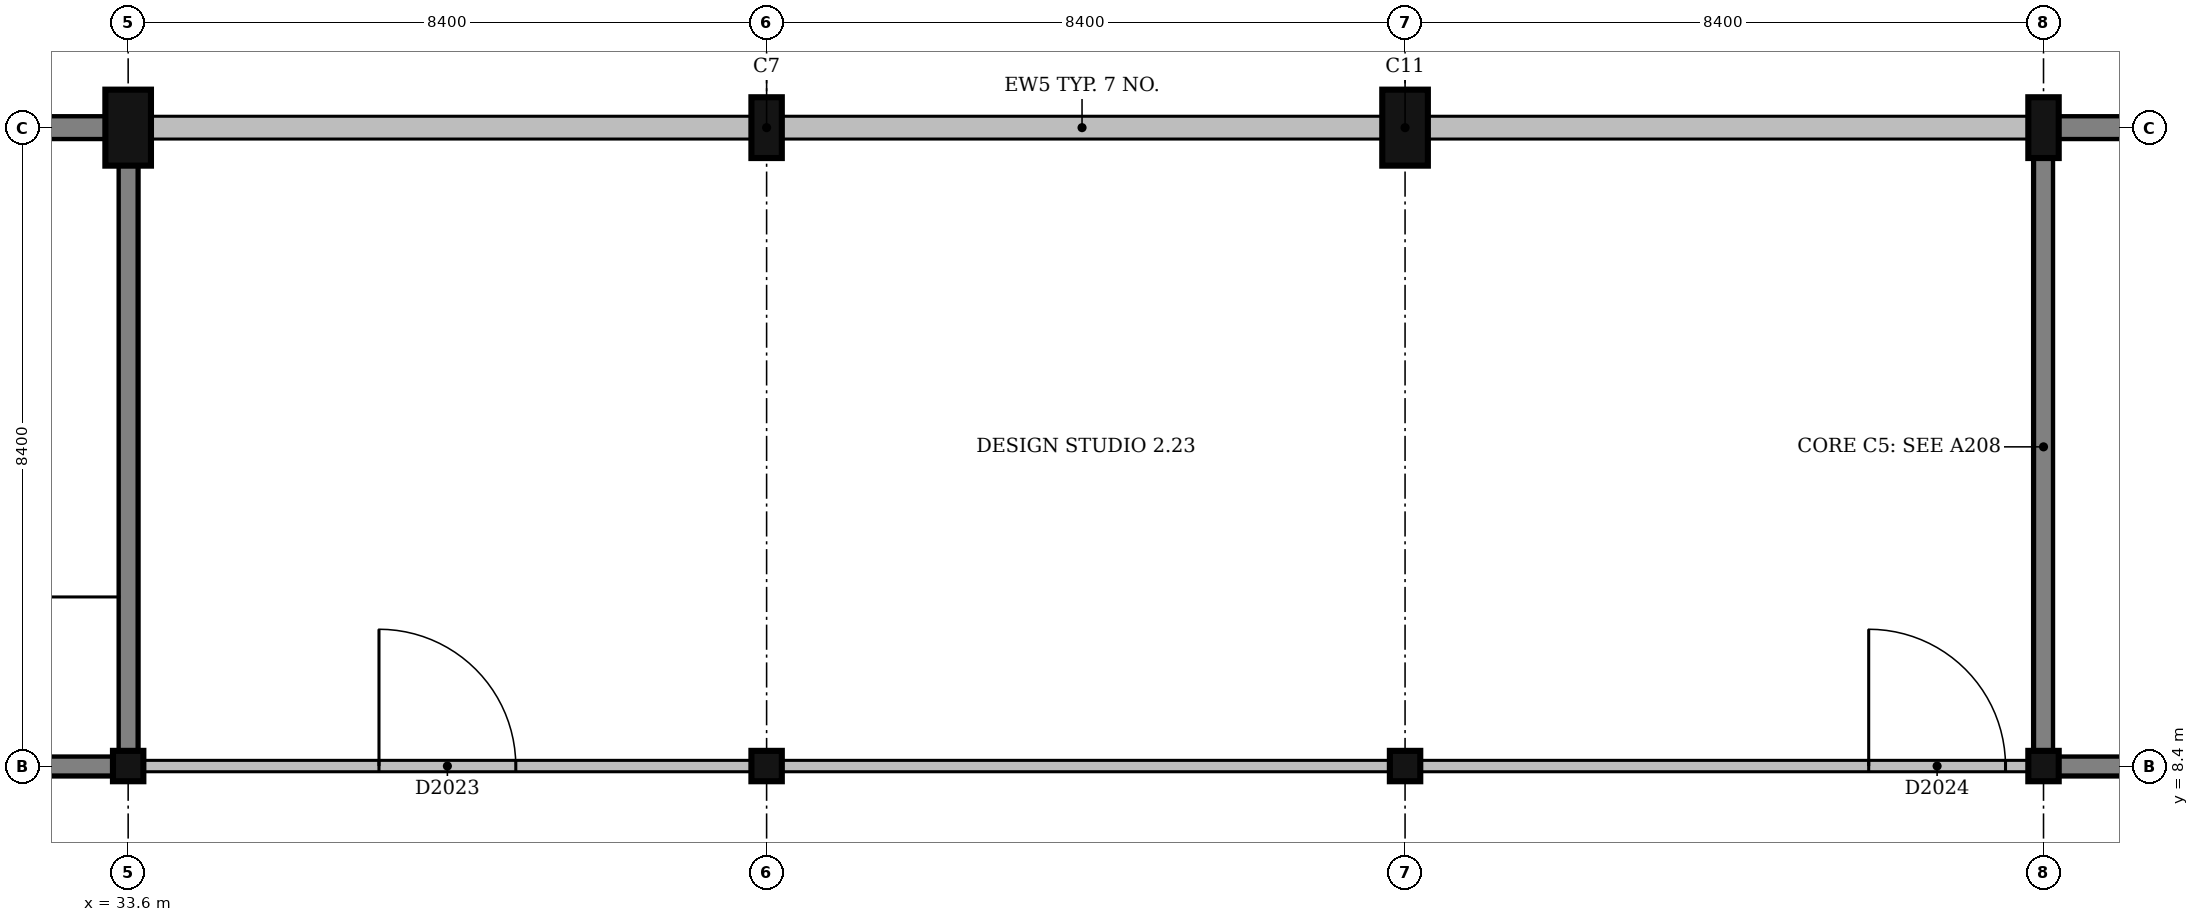
"""IFC4 building model, lengths in metres.
Left out: names, types, materials, properties, quantities, classifications, styles, units other than length and angle.
Written with IfcOpenShell. Run it as: python <this file> out.ifc"""

import sys

from ifc_helpers import new_model, si_unit, direction, frame, frame_2d, origin, origin_2d, place, context, subcontext, project, spatial, rectangle, extrude, element, fill, save


model = new_model("IFC4")
c1 = context("Model", 3, precision=1e-05, world=origin(), true_north=direction((0.0, 1.0)))
c2 = subcontext(c1, "Body", "Model", "MODEL_VIEW")
j1 = project(units=[si_unit("LENGTHUNIT", "METRE"), si_unit("PLANEANGLEUNIT", "RADIAN")], contexts=[c1])
p1 = place(None, origin())
s1 = spatial("IfcSite", under=j1, at=p1, CompositionType="ELEMENT")
p2 = place(p1, origin())
s2 = spatial("IfcBuilding", under=s1, at=p2, CompositionType="ELEMENT")
p3 = place(p2, frame((0.0, 0.0, 9.0)))
s3 = spatial("IfcBuildingStorey", under=s2, at=p3, CompositionType="ELEMENT", Elevation=9.0)
p4 = place(p3, frame((33.6, 8.4, 0.0), z_axis=(0.0, 0.0, 1.0), x_axis=(1.0, 0.0, 0.0)))
e1 = element("IfcColumn", 1, at=p4, inside=s3, PredefinedType="COLUMN", context=c2, shape_type="SweptSolid", body=[
    extrude(rectangle(XDim=0.4, YDim=0.4, at=origin_2d()), origin(), (0.0, 0.0, 1.0), 4.5),
])
p5 = place(p3, frame((33.6, 16.8, 0.0), z_axis=(0.0, 0.0, 1.0), x_axis=(1.0, 0.0, 0.0)))
e2 = element("IfcColumn", 2, at=p5, inside=s3, PredefinedType="COLUMN", context=c2, shape_type="SweptSolid", body=[
    extrude(rectangle(XDim=0.6, YDim=1.0, at=origin_2d()), origin(), (0.0, 0.0, 1.0), 4.5),
])
p6 = place(p3, frame((42.0, 8.4, 0.0), z_axis=(0.0, 0.0, 1.0), x_axis=(1.0, 0.0, 0.0)))
e3 = element("IfcColumn", 3, at=p6, inside=s3, PredefinedType="COLUMN", context=c2, shape_type="SweptSolid", body=[
    extrude(rectangle(XDim=0.4, YDim=0.4, at=origin_2d()), origin(), (0.0, 0.0, 1.0), 4.5),
])
p7 = place(p3, frame((42.0, 16.8, 0.0), z_axis=(0.0, 0.0, 1.0), x_axis=(1.0, 0.0, 0.0)))
e4 = element("IfcColumn", 4, at=p7, inside=s3, PredefinedType="COLUMN", context=c2, shape_type="SweptSolid", body=[
    extrude(rectangle(XDim=0.4, YDim=0.8, at=origin_2d()), origin(), (0.0, 0.0, 1.0), 4.5),
])
p8 = place(p3, frame((50.4, 8.4, 0.0), z_axis=(0.0, 0.0, 1.0), x_axis=(1.0, 0.0, 0.0)))
e5 = element("IfcColumn", 5, at=p8, inside=s3, PredefinedType="COLUMN", context=c2, shape_type="SweptSolid", body=[
    extrude(rectangle(XDim=0.4, YDim=0.4, at=origin_2d()), origin(), (0.0, 0.0, 1.0), 4.5),
])
p9 = place(p3, frame((50.4, 16.8, 0.0), z_axis=(0.0, 0.0, 1.0), x_axis=(1.0, 0.0, 0.0)))
e6 = element("IfcColumn", 6, at=p9, inside=s3, PredefinedType="COLUMN", context=c2, shape_type="SweptSolid", body=[
    extrude(rectangle(XDim=0.6, YDim=1.0, at=origin_2d()), origin(), (0.0, 0.0, 1.0), 4.5),
])
p10 = place(p3, frame((58.8, 8.4, 0.0), z_axis=(0.0, 0.0, 1.0), x_axis=(1.0, 0.0, 0.0)))
e7 = element("IfcColumn", 7, at=p10, inside=s3, PredefinedType="COLUMN", context=c2, shape_type="SweptSolid", body=[
    extrude(rectangle(XDim=0.4, YDim=0.4, at=origin_2d()), origin(), (0.0, 0.0, 1.0), 4.5),
])
p11 = place(p3, frame((58.8, 16.8, 0.0), z_axis=(0.0, 0.0, 1.0), x_axis=(1.0, 0.0, 0.0)))
e8 = element("IfcColumn", 8, at=p11, inside=s3, PredefinedType="COLUMN", context=c2, shape_type="SweptSolid", body=[
    extrude(rectangle(XDim=0.4, YDim=0.8, at=origin_2d()), origin(), (0.0, 0.0, 1.0), 4.5),
])
p12 = place(p3, frame((27.875, 8.4, 0.0), z_axis=(0.0, 0.0, 1.0), x_axis=(1.0, 0.0, 0.0)))
e9 = element("IfcWall", 9, at=p12, inside=s3, PredefinedType="SHEAR", context=c2, shape_type="SweptSolid", body=[
    extrude(rectangle(XDim=5.525, YDim=0.25, at=frame_2d((2.762, 0.0))), origin(), (0.0, 0.0, 1.0), 4.2),
])
p13 = place(p12, frame((2.45, 0.0, 0.0)))
e10 = element("IfcOpeningElement", 10, at=p13, cuts=e9, PredefinedType="OPENING", context=c2, shape_type="SweptSolid", body=[
    extrude(rectangle(XDim=1.0, YDim=2.1, at=frame_2d((0.5, 1.05))), frame((0.0, 0.135, 0.0), z_axis=(0.0, -1.0, 0.0), x_axis=(1.0, 0.0, 0.0)), (0.0, 0.0, 1.0), 0.27),
])
p14 = place(p3, frame((33.6, 8.6, 0.0), z_axis=(0.0, 0.0, 1.0), x_axis=(0.0, 1.0, 0.0)))
e11 = element("IfcWall", 11, at=p14, inside=s3, PredefinedType="SHEAR", context=c2, shape_type="SweptSolid", body=[
    extrude(rectangle(XDim=7.7, YDim=0.25, at=frame_2d((3.85, 0.0))), origin(), (0.0, 0.0, 1.0), 4.2),
])
p15 = place(p3, frame((59.0, 8.4, 0.0), z_axis=(0.0, 0.0, 1.0), x_axis=(1.0, 0.0, 0.0)))
e12 = element("IfcWall", 12, at=p15, inside=s3, PredefinedType="SHEAR", context=c2, shape_type="SweptSolid", body=[
    extrude(rectangle(XDim=5.525, YDim=0.25, at=frame_2d((2.762, 0.0))), origin(), (0.0, 0.0, 1.0), 4.2),
])
p16 = place(p15, frame((2.15, 0.0, 0.0)))
e13 = element("IfcOpeningElement", 13, at=p16, cuts=e12, PredefinedType="OPENING", context=c2, shape_type="SweptSolid", body=[
    extrude(rectangle(XDim=1.0, YDim=2.1, at=frame_2d((0.5, 1.05))), frame((0.0, 0.135, 0.0), z_axis=(0.0, -1.0, 0.0), x_axis=(1.0, 0.0, 0.0)), (0.0, 0.0, 1.0), 0.27),
])
p17 = place(p3, frame((58.8, 8.6, 0.0), z_axis=(0.0, 0.0, 1.0), x_axis=(0.0, 1.0, 0.0)))
e14 = element("IfcWall", 14, at=p17, inside=s3, PredefinedType="SHEAR", context=c2, shape_type="SweptSolid", body=[
    extrude(rectangle(XDim=7.8, YDim=0.25, at=frame_2d((3.9, 0.0))), origin(), (0.0, 0.0, 1.0), 4.2),
])
p18 = place(p3, frame((66.9, 16.8, 0.0), z_axis=(0.0, 0.0, 1.0), x_axis=(-1.0, 0.0, 0.0)))
e15 = element("IfcWall", 15, at=p18, inside=s3, PredefinedType="SOLIDWALL", context=c2, shape_type="SweptSolid", body=[
    extrude(rectangle(XDim=7.9, YDim=0.3, at=frame_2d((3.95, 0.0))), origin(), (0.0, 0.0, 1.0), 3.6),
])
for number, where, z_axis, x_axis in (
    (16, (58.6, 16.8, 0.0), (0.0, 0.0, 1.0), (-1.0, 0.0, 0.0)),
    (17, (50.1, 16.8, 0.0), (0.0, 0.0, 1.0), (-1.0, 0.0, 0.0)),
    (18, (41.8, 16.8, 0.0), (0.0, 0.0, 1.0), (-1.0, 0.0, 0.0)),
    (19, (33.3, 16.8, 0.0), (0.0, 0.0, 1.0), (-1.0, 0.0, 0.0)),
):
    element("IfcWall", number, at=place(p3, frame(where, z_axis=z_axis, x_axis=x_axis)), inside=s3, PredefinedType="SOLIDWALL", context=c2, shape_type="SweptSolid", body=[
        extrude(rectangle(XDim=7.9, YDim=0.3, at=frame_2d((3.95, 0.0))), origin(), (0.0, 0.0, 1.0), 3.6),
    ])
p19 = place(p3, frame((33.8, 8.4, 0.0), z_axis=(0.0, 0.0, 1.0), x_axis=(1.0, 0.0, 0.0)))
e20 = element("IfcWall", 20, at=p19, inside=s3, PredefinedType="PARTITIONING", context=c2, shape_type="SweptSolid", body=[
    extrude(rectangle(XDim=8.0, YDim=0.15, at=frame_2d((4.0, 0.0))), origin(), (0.0, 0.0, 1.0), 3.6),
])
p20 = place(p19, frame((3.1, 0.0, 0.0)))
e21 = element("IfcOpeningElement", 21, at=p20, cuts=e20, PredefinedType="OPENING", context=c2, shape_type="SweptSolid", body=[
    extrude(rectangle(XDim=1.8, YDim=2.1, at=frame_2d((0.9, 1.05))), frame((0.0, 0.085, 0.0), z_axis=(0.0, -1.0, 0.0), x_axis=(1.0, 0.0, 0.0)), (0.0, 0.0, 1.0), 0.17),
])
p21 = place(p3, frame((42.2, 8.4, 0.0), z_axis=(0.0, 0.0, 1.0), x_axis=(1.0, 0.0, 0.0)))
e22 = element("IfcWall", 22, at=p21, inside=s3, PredefinedType="PARTITIONING", context=c2, shape_type="SweptSolid", body=[
    extrude(rectangle(XDim=8.0, YDim=0.15, at=frame_2d((4.0, 0.0))), origin(), (0.0, 0.0, 1.0), 3.6),
])
p22 = place(p3, frame((50.6, 8.4, 0.0), z_axis=(0.0, 0.0, 1.0), x_axis=(1.0, 0.0, 0.0)))
e23 = element("IfcWall", 23, at=p22, inside=s3, PredefinedType="PARTITIONING", context=c2, shape_type="SweptSolid", body=[
    extrude(rectangle(XDim=8.0, YDim=0.15, at=frame_2d((4.0, 0.0))), origin(), (0.0, 0.0, 1.0), 3.6),
])
p23 = place(p22, frame((5.9, 0.0, 0.0)))
e24 = element("IfcOpeningElement", 24, at=p23, cuts=e23, PredefinedType="OPENING", context=c2, shape_type="SweptSolid", body=[
    extrude(rectangle(XDim=1.8, YDim=2.1, at=frame_2d((0.9, 1.05))), frame((0.0, 0.085, 0.0), z_axis=(0.0, -1.0, 0.0), x_axis=(1.0, 0.0, 0.0)), (0.0, 0.0, 1.0), 0.17),
])
p24 = place(p3, frame((0.0, 0.0, 4.2)))
p25 = place(p24, frame((58.5, 9.9, 0.0)))
p26 = place(p25, frame((0.0, 0.0, 0.25)))
e25 = element("IfcWindow", 25, at=p26, inside=s3, PartitioningType="SINGLE_PANEL", PredefinedType="SKYLIGHT", context=c2, shape_type="SweptSolid", body=[
    extrude(rectangle(XDim=0.9, YDim=1.2, at=origin_2d()), origin(), (0.0, 0.0, 1.0), 0.05),
])
p27 = place(p20, origin())
e26 = element("IfcDoor", 26, at=p27, inside=s3, OperationType="DOUBLE_DOOR_SINGLE_SWING", PredefinedType="DOOR", context=c2, shape_type="SweptSolid", body=[
    extrude(rectangle(XDim=1.8, YDim=2.1, at=frame_2d((0.9, 1.05))), frame((0.0, 0.025, 0.0), z_axis=(0.0, -1.0, 0.0), x_axis=(1.0, 0.0, 0.0)), (0.0, 0.0, 1.0), 0.05),
])
fill(e21, e26)
p28 = place(p23, origin())
e27 = element("IfcDoor", 27, at=p28, inside=s3, OperationType="DOUBLE_DOOR_SINGLE_SWING", PredefinedType="DOOR", context=c2, shape_type="SweptSolid", body=[
    extrude(rectangle(XDim=1.8, YDim=2.1, at=frame_2d((0.9, 1.05))), frame((0.0, 0.025, 0.0), z_axis=(0.0, -1.0, 0.0), x_axis=(1.0, 0.0, 0.0)), (0.0, 0.0, 1.0), 0.05),
])
fill(e24, e27)
save(model, sys.argv[1])
